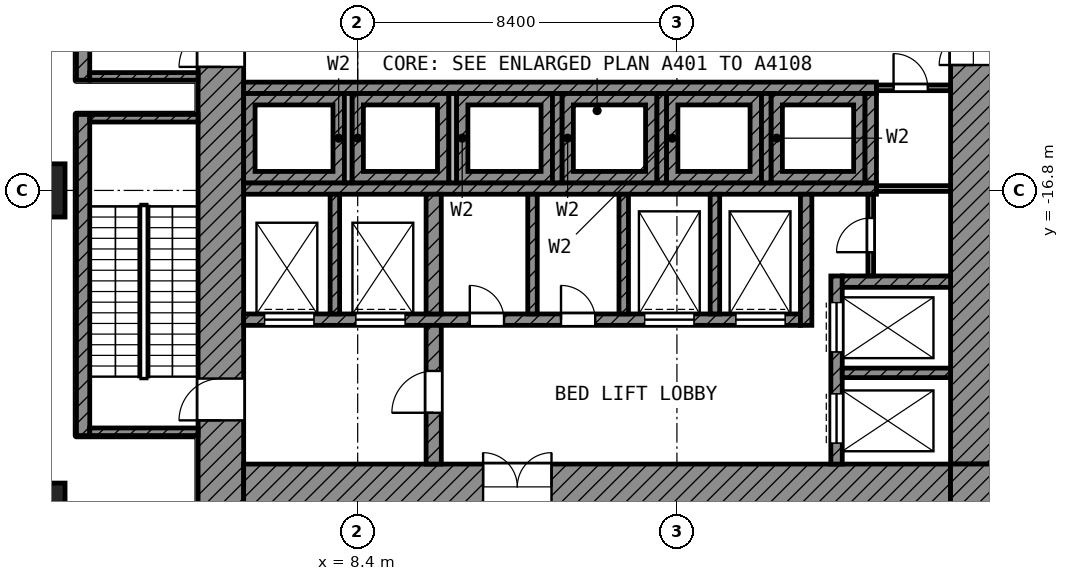
"""IFC4 building model, lengths in metres.
Left out: names, types, materials, properties, quantities, classifications, styles, units other than length and angle.
Written with IfcOpenShell. Run it as: python <this file> out.ifc"""

import sys

from ifc_helpers import new_model, si_unit, direction, frame, frame_2d, origin, origin_2d, place, context, subcontext, project, spatial, polyline, rectangle, outline, extrude, element, fill, save


model = new_model("IFC4")
c1 = context("Model", 3, precision=1e-05, world=origin(), true_north=direction((0.0, 1.0)))
c2 = subcontext(c1, "Body", "Model", "MODEL_VIEW")
j1 = project(units=[si_unit("LENGTHUNIT", "METRE"), si_unit("PLANEANGLEUNIT", "RADIAN")], contexts=[c1])
p1 = place(None, origin())
s1 = spatial("IfcSite", under=j1, at=p1, CompositionType="ELEMENT")
p2 = place(p1, origin())
s2 = spatial("IfcBuilding", under=s1, at=p2, CompositionType="ELEMENT")
p3 = place(p2, frame((0.0, 0.0, -6.0)))
s3 = spatial("IfcBuildingStorey", under=s2, at=p3, CompositionType="ELEMENT", Elevation=-6.0)
p4 = place(p3, origin())
e1 = element("IfcWall", 1, at=p4, inside=s3, PredefinedType="SHEAR", context=c2, shape_type="SweptSolid", body=[
    extrude(outline(polyline([(11.0, -16.6), (11.0, -14.25), (13.525, -14.25), (13.525, -16.6), (11.0, -16.6)]), holes=[polyline([(13.225, -14.55), (11.3, -14.55), (11.3, -16.3), (13.225, -16.3), (13.225, -14.55)])]), origin(), (0.0, 0.0, 1.0), 4.2),
])
e2 = element("IfcWall", 2, at=p4, inside=s3, PredefinedType="SHEAR", context=c2, shape_type="SweptSolid", body=[
    extrude(outline(polyline([(13.775, -16.6), (13.775, -14.25), (16.275, -14.25), (16.275, -16.6), (13.775, -16.6)]), holes=[polyline([(15.975, -14.55), (14.075, -14.55), (14.075, -16.3), (15.975, -16.3), (15.975, -14.55)])]), origin(), (0.0, 0.0, 1.0), 4.2),
])
e3 = element("IfcWall", 3, at=p4, inside=s3, PredefinedType="SHEAR", context=c2, shape_type="SweptSolid", body=[
    extrude(outline(polyline([(16.525, -16.6), (16.525, -14.25), (19.025, -14.25), (19.025, -16.6), (16.525, -16.6)]), holes=[polyline([(18.725, -14.55), (16.825, -14.55), (16.825, -16.3), (18.725, -16.3), (18.725, -14.55)])]), origin(), (0.0, 0.0, 1.0), 4.2),
])
e4 = element("IfcWall", 4, at=p4, inside=s3, PredefinedType="SHEAR", context=c2, shape_type="SweptSolid", body=[
    extrude(outline(polyline([(19.275, -16.6), (19.275, -14.25), (21.75, -14.25), (21.75, -16.6), (19.275, -16.6)]), holes=[polyline([(21.45, -14.55), (19.575, -14.55), (19.575, -16.3), (21.45, -16.3), (21.45, -14.55)])]), origin(), (0.0, 0.0, 1.0), 4.2),
])
e5 = element("IfcWall", 5, at=p4, inside=s3, PredefinedType="SHEAR", context=c2, shape_type="SweptSolid", body=[
    extrude(outline(polyline([(5.4, -16.6), (5.4, -14.25), (8.05, -14.25), (8.05, -16.6), (5.4, -16.6)]), holes=[polyline([(7.75, -14.55), (5.7, -14.55), (5.7, -16.3), (7.75, -16.3), (7.75, -14.55)])]), origin(), (0.0, 0.0, 1.0), 4.2),
])
e6 = element("IfcWall", 6, at=p4, inside=s3, PredefinedType="SHEAR", context=c2, shape_type="SweptSolid", body=[
    extrude(outline(polyline([(8.25, -16.6), (8.25, -14.25), (10.8, -14.25), (10.8, -16.6), (8.25, -16.6)]), holes=[polyline([(10.5, -14.55), (8.55, -14.55), (8.55, -16.3), (10.5, -16.3), (10.5, -14.55)])]), origin(), (0.0, 0.0, 1.0), 4.2),
])
for number, where, z_axis, x_axis in (
    (7, (0.0, -16.8, 0.0), (0.0, 0.0, 1.0), (1.0, 0.0, 0.0)),
    (8, (0.0, -25.2, 0.0), (0.0, 0.0, 1.0), (1.0, 0.0, 0.0)),
):
    element("IfcColumn", number, at=place(p3, frame(where, z_axis=z_axis, x_axis=x_axis)), inside=s3, PredefinedType="COLUMN", context=c2, shape_type="SweptSolid", body=[
        extrude(rectangle(XDim=1.4, YDim=1.4, at=origin_2d()), origin(), (0.0, 0.0, 1.0), 6.0),
    ])
p5 = place(p3, frame((4.8, -25.2, 0.0), z_axis=(0.0, 0.0, 1.0), x_axis=(0.0, 1.0, 0.0)))
e9 = element("IfcWall", 9, at=p5, inside=s3, PredefinedType="SHEAR", context=c2, shape_type="SweptSolid", body=[
    extrude(rectangle(XDim=19.8, YDim=1.2, at=frame_2d((9.9, 0.0))), origin(), (0.0, 0.0, 1.0), 5.55),
])
p6 = place(p5, frame((11.65, 0.0, 0.0)))
e10 = element("IfcOpeningElement", 10, at=p6, cuts=e9, PredefinedType="OPENING", context=c2, shape_type="SweptSolid", body=[
    extrude(rectangle(XDim=1.1, YDim=2.1, at=frame_2d((0.55, 1.05))), frame((0.0, 0.61, 0.0), z_axis=(0.0, -1.0, 0.0), x_axis=(1.0, 0.0, 0.0)), (0.0, 0.0, 1.0), 1.22),
])
p7 = place(p5, frame((2.35, 0.0, 0.0)))
e11 = element("IfcOpeningElement", 11, at=p7, cuts=e9, PredefinedType="OPENING", context=c2, shape_type="SweptSolid", body=[
    extrude(rectangle(XDim=1.1, YDim=2.1, at=frame_2d((0.55, 1.05))), frame((0.0, 0.61, 0.0), z_axis=(0.0, -1.0, 0.0), x_axis=(1.0, 0.0, 0.0)), (0.0, 0.0, 1.0), 1.22),
])
p8 = place(p3, frame((24.6, -24.0, 0.0), z_axis=(0.0, 0.0, 1.0), x_axis=(0.0, 1.0, 0.0)))
e12 = element("IfcWall", 12, at=p8, inside=s3, PredefinedType="SHEAR", context=c2, shape_type="SweptSolid", body=[
    extrude(rectangle(XDim=18.6, YDim=1.2, at=frame_2d((9.3, 0.0))), origin(), (0.0, 0.0, 1.0), 5.55),
])
p9 = place(p8, frame((10.5, 0.0, 0.0)))
e13 = element("IfcOpeningElement", 13, at=p9, cuts=e12, PredefinedType="OPENING", context=c2, shape_type="SweptSolid", body=[
    extrude(rectangle(XDim=1.8, YDim=2.1, at=frame_2d((0.9, 1.05))), frame((0.0, 0.61, 0.0), z_axis=(0.0, -1.0, 0.0), x_axis=(1.0, 0.0, 0.0)), (0.0, 0.0, 1.0), 1.22),
])
p10 = place(p3, frame((5.4, -24.6, 0.0), z_axis=(0.0, 0.0, 1.0), x_axis=(1.0, 0.0, 0.0)))
e14 = element("IfcWall", 14, at=p10, inside=s3, PredefinedType="SHEAR", context=c2, shape_type="SweptSolid", body=[
    extrude(rectangle(XDim=18.6, YDim=1.2, at=frame_2d((9.3, 0.0))), origin(), (0.0, 0.0, 1.0), 5.55),
])
p11 = place(p10, frame((6.3, 0.0, 0.0)))
e15 = element("IfcOpeningElement", 15, at=p11, cuts=e14, PredefinedType="OPENING", context=c2, shape_type="SweptSolid", body=[
    extrude(rectangle(XDim=1.8, YDim=2.1, at=frame_2d((0.9, 1.05))), frame((0.0, 0.61, 0.0), z_axis=(0.0, -1.0, 0.0), x_axis=(1.0, 0.0, 0.0)), (0.0, 0.0, 1.0), 1.22),
])
p12 = place(p3, frame((24.6, -25.2, 0.0), z_axis=(0.0, 0.0, 1.0), x_axis=(0.0, 1.0, 0.0)))
e16 = element("IfcWall", 16, at=p12, inside=s3, PredefinedType="SHEAR", context=c2, shape_type="SweptSolid", body=[
    extrude(rectangle(XDim=1.2, YDim=1.2, at=frame_2d((0.6, 0.0))), origin(), (0.0, 0.0, 1.0), 5.55),
])
for number, where, z_axis, x_axis in (
    (17, (5.4, -14.1, 0.0), (0.0, 0.0, 1.0), (1.0, 0.0, 0.0)),
    (18, (5.4, -16.75, 0.0), (0.0, 0.0, 1.0), (1.0, 0.0, 0.0)),
):
    element("IfcWall", number, at=place(p3, frame(where, z_axis=z_axis, x_axis=x_axis)), inside=s3, PredefinedType="SHEAR", context=c2, shape_type="SweptSolid", body=[
        extrude(rectangle(XDim=16.65, YDim=0.3, at=frame_2d((8.325, 0.0))), origin(), (0.0, 0.0, 1.0), 5.55),
    ])
p13 = place(p3, frame((5.4, -20.2, 0.0), z_axis=(0.0, 0.0, 1.0), x_axis=(1.0, 0.0, 0.0)))
e19 = element("IfcWall", 19, at=p13, inside=s3, PredefinedType="SHEAR", context=c2, shape_type="SweptSolid", body=[
    extrude(rectangle(XDim=14.65, YDim=0.3, at=frame_2d((7.325, 0.0))), origin(), (0.0, 0.0, 1.0), 5.55),
])
p14 = place(p13, frame((10.55, 0.0, 0.0)))
e20 = element("IfcOpeningElement", 20, at=p14, cuts=e19, PredefinedType="OPENING", context=c2, shape_type="SweptSolid", body=[
    extrude(rectangle(XDim=1.3, YDim=2.1, at=frame_2d((0.65, 1.05))), frame((0.0, 0.16, 0.0), z_axis=(0.0, -1.0, 0.0), x_axis=(1.0, 0.0, 0.0)), (0.0, 0.0, 1.0), 0.32),
])
p15 = place(p13, frame((12.95, 0.0, 0.0)))
e21 = element("IfcOpeningElement", 21, at=p15, cuts=e19, PredefinedType="OPENING", context=c2, shape_type="SweptSolid", body=[
    extrude(rectangle(XDim=1.3, YDim=2.1, at=frame_2d((0.65, 1.05))), frame((0.0, 0.16, 0.0), z_axis=(0.0, -1.0, 0.0), x_axis=(1.0, 0.0, 0.0)), (0.0, 0.0, 1.0), 0.32),
])
p16 = place(p13, frame((0.55, 0.0, 0.0)))
e22 = element("IfcOpeningElement", 22, at=p16, cuts=e19, PredefinedType="OPENING", context=c2, shape_type="SweptSolid", body=[
    extrude(rectangle(XDim=1.3, YDim=2.1, at=frame_2d((0.65, 1.05))), frame((0.0, 0.16, 0.0), z_axis=(0.0, -1.0, 0.0), x_axis=(1.0, 0.0, 0.0)), (0.0, 0.0, 1.0), 0.32),
])
p17 = place(p13, frame((2.95, 0.0, 0.0)))
e23 = element("IfcOpeningElement", 23, at=p17, cuts=e19, PredefinedType="OPENING", context=c2, shape_type="SweptSolid", body=[
    extrude(rectangle(XDim=1.3, YDim=2.1, at=frame_2d((0.65, 1.05))), frame((0.0, 0.16, 0.0), z_axis=(0.0, -1.0, 0.0), x_axis=(1.0, 0.0, 0.0)), (0.0, 0.0, 1.0), 0.32),
])
p18 = place(p13, frame((5.95, 0.0, 0.0)))
e24 = element("IfcOpeningElement", 24, at=p18, cuts=e19, PredefinedType="OPENING", context=c2, shape_type="SweptSolid", body=[
    extrude(rectangle(XDim=0.9, YDim=2.1, at=frame_2d((0.45, 1.05))), frame((0.0, 0.16, 0.0), z_axis=(0.0, -1.0, 0.0), x_axis=(1.0, 0.0, 0.0)), (0.0, 0.0, 1.0), 0.32),
])
p19 = place(p13, frame((8.35, 0.0, 0.0)))
e25 = element("IfcOpeningElement", 25, at=p19, cuts=e19, PredefinedType="OPENING", context=c2, shape_type="SweptSolid", body=[
    extrude(rectangle(XDim=0.9, YDim=2.1, at=frame_2d((0.45, 1.05))), frame((0.0, 0.16, 0.0), z_axis=(0.0, -1.0, 0.0), x_axis=(1.0, 0.0, 0.0)), (0.0, 0.0, 1.0), 0.32),
])
p20 = place(p3, frame((10.4, -24.0, 0.0), z_axis=(0.0, 0.0, 1.0), x_axis=(0.0, 1.0, 0.0)))
e26 = element("IfcWall", 26, at=p20, inside=s3, PredefinedType="SHEAR", context=c2, shape_type="SweptSolid", body=[
    extrude(rectangle(XDim=3.65, YDim=0.4, at=frame_2d((1.825, 0.0))), origin(), (0.0, 0.0, 1.0), 5.55),
])
p21 = place(p20, frame((1.35, 0.0, 0.0)))
e27 = element("IfcOpeningElement", 27, at=p21, cuts=e26, PredefinedType="OPENING", context=c2, shape_type="SweptSolid", body=[
    extrude(rectangle(XDim=1.1, YDim=2.1, at=frame_2d((0.55, 1.05))), frame((0.0, 0.21, 0.0), z_axis=(0.0, -1.0, 0.0), x_axis=(1.0, 0.0, 0.0)), (0.0, 0.0, 1.0), 0.42),
])
p22 = place(p3, frame((10.4, -20.05, 0.0), z_axis=(0.0, 0.0, 1.0), x_axis=(0.0, 1.0, 0.0)))
e28 = element("IfcWall", 28, at=p22, inside=s3, PredefinedType="SHEAR", context=c2, shape_type="SweptSolid", body=[
    extrude(rectangle(XDim=3.15, YDim=0.4, at=frame_2d((1.575, 0.0))), origin(), (0.0, 0.0, 1.0), 5.55),
])
p23 = place(p3, frame((20.2, -20.35, 0.0), z_axis=(0.0, 0.0, 1.0), x_axis=(0.0, 1.0, 0.0)))
e29 = element("IfcWall", 29, at=p23, inside=s3, PredefinedType="SHEAR", context=c2, shape_type="SweptSolid", body=[
    extrude(rectangle(XDim=3.45, YDim=0.3, at=frame_2d((1.725, 0.0))), origin(), (0.0, 0.0, 1.0), 5.55),
])
p24 = place(p3, frame((21.9, -16.6, 0.0), z_axis=(0.0, 0.0, 1.0), x_axis=(0.0, 1.0, 0.0)))
e30 = element("IfcWall", 30, at=p24, inside=s3, PredefinedType="SHEAR", context=c2, shape_type="SweptSolid", body=[
    extrude(rectangle(XDim=2.35, YDim=0.3, at=frame_2d((1.175, 0.0))), origin(), (0.0, 0.0, 1.0), 5.55),
])
p25 = place(p3, frame((21.15, -19.2, 0.0), z_axis=(0.0, 0.0, 1.0), x_axis=(1.0, 0.0, 0.0)))
e31 = element("IfcWall", 31, at=p25, inside=s3, PredefinedType="SHEAR", context=c2, shape_type="SweptSolid", body=[
    extrude(rectangle(XDim=2.85, YDim=0.3, at=frame_2d((1.425, 0.0))), origin(), (0.0, 0.0, 1.0), 5.55),
])
p26 = place(p3, frame((21.0, -24.0, 0.0), z_axis=(0.0, 0.0, 1.0), x_axis=(0.0, 1.0, 0.0)))
e32 = element("IfcWall", 32, at=p26, inside=s3, PredefinedType="SHEAR", context=c2, shape_type="SweptSolid", body=[
    extrude(rectangle(XDim=4.95, YDim=0.3, at=frame_2d((2.475, 0.0))), origin(), (0.0, 0.0, 1.0), 5.55),
])
p27 = place(p26, frame((2.95, 0.0, 0.0)))
e33 = element("IfcOpeningElement", 33, at=p27, cuts=e32, PredefinedType="OPENING", context=c2, shape_type="SweptSolid", body=[
    extrude(rectangle(XDim=1.3, YDim=2.1, at=frame_2d((0.65, 1.05))), frame((0.0, 0.16, 0.0), z_axis=(0.0, -1.0, 0.0), x_axis=(1.0, 0.0, 0.0)), (0.0, 0.0, 1.0), 0.32),
])
p28 = place(p26, frame((0.55, 0.0, 0.0)))
e34 = element("IfcOpeningElement", 34, at=p28, cuts=e32, PredefinedType="OPENING", context=c2, shape_type="SweptSolid", body=[
    extrude(rectangle(XDim=1.3, YDim=2.1, at=frame_2d((0.65, 1.05))), frame((0.0, 0.16, 0.0), z_axis=(0.0, -1.0, 0.0), x_axis=(1.0, 0.0, 0.0)), (0.0, 0.0, 1.0), 0.32),
])
p29 = place(p3, frame((21.15, -21.6, 0.0), z_axis=(0.0, 0.0, 1.0), x_axis=(1.0, 0.0, 0.0)))
e35 = element("IfcWall", 35, at=p29, inside=s3, PredefinedType="SHEAR", context=c2, shape_type="SweptSolid", body=[
    extrude(rectangle(XDim=2.85, YDim=0.25, at=frame_2d((1.425, 0.0))), origin(), (0.0, 0.0, 1.0), 5.55),
])
for number, where, z_axis, x_axis in (
    (36, (7.8, -20.05, 0.0), (0.0, 0.0, 1.0), (0.0, 1.0, 0.0)),
    (37, (13.0, -20.05, 0.0), (0.0, 0.0, 1.0), (0.0, 1.0, 0.0)),
    (38, (15.4, -20.05, 0.0), (0.0, 0.0, 1.0), (0.0, 1.0, 0.0)),
    (39, (17.8, -20.05, 0.0), (0.0, 0.0, 1.0), (0.0, 1.0, 0.0)),
):
    element("IfcWall", number, at=place(p3, frame(where, z_axis=z_axis, x_axis=x_axis)), inside=s3, PredefinedType="SHEAR", context=c2, shape_type="SweptSolid", body=[
        extrude(rectangle(XDim=3.15, YDim=0.25, at=frame_2d((1.575, 0.0))), origin(), (0.0, 0.0, 1.0), 5.55),
    ])
for number, where, z_axis, x_axis in (
    (40, (8.15, -16.6, 0.0), (0.0, 0.0, 1.0), (0.0, 1.0, 0.0)),
    (41, (10.9, -16.6, 0.0), (0.0, 0.0, 1.0), (0.0, 1.0, 0.0)),
):
    element("IfcWall", number, at=place(p3, frame(where, z_axis=z_axis, x_axis=x_axis)), inside=s3, PredefinedType="PARTITIONING", context=c2, shape_type="SweptSolid", body=[
        extrude(rectangle(XDim=2.35, YDim=0.2, at=frame_2d((1.175, 0.0))), origin(), (0.0, 0.0, 1.0), 5.55),
    ])
for number, where, z_axis, x_axis in (
    (42, (13.65, -16.6, 0.0), (0.0, 0.0, 1.0), (0.0, 1.0, 0.0)),
    (43, (16.4, -16.6, 0.0), (0.0, 0.0, 1.0), (0.0, 1.0, 0.0)),
    (44, (19.15, -16.6, 0.0), (0.0, 0.0, 1.0), (0.0, 1.0, 0.0)),
):
    element("IfcWall", number, at=place(p3, frame(where, z_axis=z_axis, x_axis=x_axis)), inside=s3, PredefinedType="SHEAR", context=c2, shape_type="SweptSolid", body=[
        extrude(rectangle(XDim=2.35, YDim=0.25, at=frame_2d((1.175, 0.0))), origin(), (0.0, 0.0, 1.0), 5.55),
    ])
p30 = place(p3, frame((21.9, -19.05, 0.0), z_axis=(0.0, 0.0, 1.0), x_axis=(0.0, 1.0, 0.0)))
e45 = element("IfcWall", 45, at=p30, inside=s3, PredefinedType="PARTITIONING", context=c2, shape_type="SweptSolid", body=[
    extrude(rectangle(XDim=2.15, YDim=0.15, at=frame_2d((1.075, 0.0))), origin(), (0.0, 0.0, 1.0), 5.55),
])
p31 = place(p30, frame((0.625, 0.0, 0.0)))
e46 = element("IfcOpeningElement", 46, at=p31, cuts=e45, PredefinedType="OPENING", context=c2, shape_type="SweptSolid", body=[
    extrude(rectangle(XDim=0.9, YDim=2.1, at=frame_2d((0.45, 1.05))), frame((0.0, 0.085, 0.0), z_axis=(0.0, -1.0, 0.0), x_axis=(1.0, 0.0, 0.0)), (0.0, 0.0, 1.0), 0.17),
])
p32 = place(p3, frame((22.05, -16.75, 0.0), z_axis=(0.0, 0.0, 1.0), x_axis=(1.0, 0.0, 0.0)))
e47 = element("IfcWall", 47, at=p32, inside=s3, PredefinedType="PARTITIONING", context=c2, shape_type="SweptSolid", body=[
    extrude(rectangle(XDim=1.95, YDim=0.15, at=frame_2d((0.975, 0.0))), origin(), (0.0, 0.0, 1.0), 5.55),
])
p33 = place(p3, frame((22.05, -14.1, 0.0), z_axis=(0.0, 0.0, 1.0), x_axis=(1.0, 0.0, 0.0)))
e48 = element("IfcWall", 48, at=p33, inside=s3, PredefinedType="PARTITIONING", context=c2, shape_type="SweptSolid", body=[
    extrude(rectangle(XDim=1.95, YDim=0.15, at=frame_2d((0.975, 0.0))), origin(), (0.0, 0.0, 1.0), 5.55),
])
p34 = place(p33, frame((0.45, 0.0, 0.0)))
e49 = element("IfcOpeningElement", 49, at=p34, cuts=e48, PredefinedType="OPENING", context=c2, shape_type="SweptSolid", body=[
    extrude(rectangle(XDim=0.9, YDim=2.1, at=frame_2d((0.45, 1.05))), frame((0.0, 0.085, 0.0), z_axis=(0.0, -1.0, 0.0), x_axis=(1.0, 0.0, 0.0)), (0.0, 0.0, 1.0), 0.17),
])
p35 = place(p3, frame((1.175, -13.9, 0.0), z_axis=(0.0, 0.0, 1.0), x_axis=(0.0, 1.0, 0.0)))
e50 = element("IfcWall", 50, at=p35, inside=s3, PredefinedType="SHEAR", context=c2, shape_type="SweptSolid", body=[
    extrude(rectangle(XDim=8.635, YDim=0.35, at=frame_2d((4.317, 0.0))), origin(), (0.0, 0.0, 1.0), 5.55),
])
p36 = place(p3, frame((1.35, -13.8, 0.0), z_axis=(0.0, 0.0, 1.0), x_axis=(1.0, 0.0, 0.0)))
e51 = element("IfcWall", 51, at=p36, inside=s3, PredefinedType="SHEAR", context=c2, shape_type="SweptSolid", body=[
    extrude(rectangle(XDim=2.85, YDim=0.2, at=frame_2d((1.425, 0.0))), origin(), (0.0, 0.0, 1.0), 5.55),
])
p37 = place(p3, frame((1.175, -23.25, 0.0), z_axis=(0.0, 0.0, 1.0), x_axis=(0.0, 1.0, 0.0)))
e52 = element("IfcWall", 52, at=p37, inside=s3, PredefinedType="SHEAR", context=c2, shape_type="SweptSolid", body=[
    extrude(rectangle(XDim=8.45, YDim=0.35, at=frame_2d((4.225, 0.0))), origin(), (0.0, 0.0, 1.0), 5.55),
])
for number, where, z_axis, x_axis in (
    (53, (1.35, -14.9, 0.0), (0.0, 0.0, 1.0), (1.0, 0.0, 0.0)),
    (54, (1.35, -23.15, 0.0), (0.0, 0.0, 1.0), (1.0, 0.0, 0.0)),
):
    element("IfcWall", number, at=place(p3, frame(where, z_axis=z_axis, x_axis=x_axis)), inside=s3, PredefinedType="SHEAR", context=c2, shape_type="SweptSolid", body=[
        extrude(rectangle(XDim=2.85, YDim=0.2, at=frame_2d((1.425, 0.0))), origin(), (0.0, 0.0, 1.0), 5.55),
    ])
p38 = place(p27, origin())
e55 = element("IfcDoor", 55, at=p38, inside=s3, OperationType="DOUBLE_DOOR_SLIDING", PredefinedType="DOOR", context=c2, shape_type="SweptSolid", body=[
    extrude(rectangle(XDim=1.3, YDim=2.1, at=frame_2d((0.65, 1.05))), frame((0.0, 0.025, 0.0), z_axis=(0.0, -1.0, 0.0), x_axis=(1.0, 0.0, 0.0)), (0.0, 0.0, 1.0), 0.05),
])
fill(e33, e55)
p39 = place(p28, origin())
e56 = element("IfcDoor", 56, at=p39, inside=s3, OperationType="DOUBLE_DOOR_SLIDING", PredefinedType="DOOR", context=c2, shape_type="SweptSolid", body=[
    extrude(rectangle(XDim=1.3, YDim=2.1, at=frame_2d((0.65, 1.05))), frame((0.0, 0.025, 0.0), z_axis=(0.0, -1.0, 0.0), x_axis=(1.0, 0.0, 0.0)), (0.0, 0.0, 1.0), 0.05),
])
fill(e34, e56)
p40 = place(p14, origin())
e57 = element("IfcDoor", 57, at=p40, inside=s3, OperationType="DOUBLE_DOOR_SLIDING", PredefinedType="DOOR", context=c2, shape_type="SweptSolid", body=[
    extrude(rectangle(XDim=1.3, YDim=2.1, at=frame_2d((0.65, 1.05))), frame((0.0, 0.025, 0.0), z_axis=(0.0, -1.0, 0.0), x_axis=(1.0, 0.0, 0.0)), (0.0, 0.0, 1.0), 0.05),
])
fill(e20, e57)
p41 = place(p15, origin())
e58 = element("IfcDoor", 58, at=p41, inside=s3, OperationType="DOUBLE_DOOR_SLIDING", PredefinedType="DOOR", context=c2, shape_type="SweptSolid", body=[
    extrude(rectangle(XDim=1.3, YDim=2.1, at=frame_2d((0.65, 1.05))), frame((0.0, 0.025, 0.0), z_axis=(0.0, -1.0, 0.0), x_axis=(1.0, 0.0, 0.0)), (0.0, 0.0, 1.0), 0.05),
])
fill(e21, e58)
p42 = place(p16, origin())
e59 = element("IfcDoor", 59, at=p42, inside=s3, OperationType="DOUBLE_DOOR_SLIDING", PredefinedType="DOOR", context=c2, shape_type="SweptSolid", body=[
    extrude(rectangle(XDim=1.3, YDim=2.1, at=frame_2d((0.65, 1.05))), frame((0.0, 0.025, 0.0), z_axis=(0.0, -1.0, 0.0), x_axis=(1.0, 0.0, 0.0)), (0.0, 0.0, 1.0), 0.05),
])
fill(e22, e59)
p43 = place(p17, origin())
e60 = element("IfcDoor", 60, at=p43, inside=s3, OperationType="DOUBLE_DOOR_SLIDING", PredefinedType="DOOR", context=c2, shape_type="SweptSolid", body=[
    extrude(rectangle(XDim=1.3, YDim=2.1, at=frame_2d((0.65, 1.05))), frame((0.0, 0.025, 0.0), z_axis=(0.0, -1.0, 0.0), x_axis=(1.0, 0.0, 0.0)), (0.0, 0.0, 1.0), 0.05),
])
fill(e23, e60)
p44 = place(p6, origin())
e61 = element("IfcDoor", 61, at=p44, inside=s3, OperationType="SINGLE_SWING_LEFT", PredefinedType="DOOR", context=c2, shape_type="SweptSolid", body=[
    extrude(rectangle(XDim=1.1, YDim=2.1, at=frame_2d((0.55, 1.05))), frame((0.0, 0.025, 0.0), z_axis=(0.0, -1.0, 0.0), x_axis=(1.0, 0.0, 0.0)), (0.0, 0.0, 1.0), 0.05),
])
fill(e10, e61)
p45 = place(p7, origin())
e62 = element("IfcDoor", 62, at=p45, inside=s3, OperationType="SINGLE_SWING_LEFT", PredefinedType="DOOR", context=c2, shape_type="SweptSolid", body=[
    extrude(rectangle(XDim=1.1, YDim=2.1, at=frame_2d((0.55, 1.05))), frame((0.0, 0.025, 0.0), z_axis=(0.0, -1.0, 0.0), x_axis=(1.0, 0.0, 0.0)), (0.0, 0.0, 1.0), 0.05),
])
fill(e11, e62)
p46 = place(p21, origin())
e63 = element("IfcDoor", 63, at=p46, inside=s3, OperationType="SINGLE_SWING_LEFT", PredefinedType="DOOR", context=c2, shape_type="SweptSolid", body=[
    extrude(rectangle(XDim=1.1, YDim=2.1, at=frame_2d((0.55, 1.05))), frame((0.0, 0.025, 0.0), z_axis=(0.0, -1.0, 0.0), x_axis=(1.0, 0.0, 0.0)), (0.0, 0.0, 1.0), 0.05),
])
fill(e27, e63)
p47 = place(p9, origin())
e64 = element("IfcDoor", 64, at=p47, inside=s3, OperationType="DOUBLE_DOOR_SINGLE_SWING", PredefinedType="DOOR", context=c2, shape_type="SweptSolid", body=[
    extrude(rectangle(XDim=1.8, YDim=2.1, at=frame_2d((0.9, 1.05))), frame((0.0, 0.025, 0.0), z_axis=(0.0, -1.0, 0.0), x_axis=(1.0, 0.0, 0.0)), (0.0, 0.0, 1.0), 0.05),
])
fill(e13, e64)
p48 = place(p11, origin())
e65 = element("IfcDoor", 65, at=p48, inside=s3, OperationType="DOUBLE_DOOR_SINGLE_SWING", PredefinedType="DOOR", context=c2, shape_type="SweptSolid", body=[
    extrude(rectangle(XDim=1.8, YDim=2.1, at=frame_2d((0.9, 1.05))), frame((0.0, 0.025, 0.0), z_axis=(0.0, -1.0, 0.0), x_axis=(1.0, 0.0, 0.0)), (0.0, 0.0, 1.0), 0.05),
])
fill(e15, e65)
p49 = place(p34, origin())
e66 = element("IfcDoor", 66, at=p49, inside=s3, OperationType="SINGLE_SWING_LEFT", PredefinedType="DOOR", context=c2, shape_type="SweptSolid", body=[
    extrude(rectangle(XDim=0.9, YDim=2.1, at=frame_2d((0.45, 1.05))), frame((0.0, 0.025, 0.0), z_axis=(0.0, -1.0, 0.0), x_axis=(1.0, 0.0, 0.0)), (0.0, 0.0, 1.0), 0.05),
])
fill(e49, e66)
p50 = place(p31, origin())
e67 = element("IfcDoor", 67, at=p50, inside=s3, OperationType="SINGLE_SWING_LEFT", PredefinedType="DOOR", context=c2, shape_type="SweptSolid", body=[
    extrude(rectangle(XDim=0.9, YDim=2.1, at=frame_2d((0.45, 1.05))), frame((0.0, 0.025, 0.0), z_axis=(0.0, -1.0, 0.0), x_axis=(1.0, 0.0, 0.0)), (0.0, 0.0, 1.0), 0.05),
])
fill(e46, e67)
p51 = place(p18, origin())
e68 = element("IfcDoor", 68, at=p51, inside=s3, OperationType="SINGLE_SWING_LEFT", PredefinedType="DOOR", context=c2, shape_type="SweptSolid", body=[
    extrude(rectangle(XDim=0.9, YDim=2.1, at=frame_2d((0.45, 1.05))), frame((0.0, 0.025, 0.0), z_axis=(0.0, -1.0, 0.0), x_axis=(1.0, 0.0, 0.0)), (0.0, 0.0, 1.0), 0.05),
])
fill(e24, e68)
p52 = place(p19, origin())
e69 = element("IfcDoor", 69, at=p52, inside=s3, OperationType="SINGLE_SWING_LEFT", PredefinedType="DOOR", context=c2, shape_type="SweptSolid", body=[
    extrude(rectangle(XDim=0.9, YDim=2.1, at=frame_2d((0.45, 1.05))), frame((0.0, 0.025, 0.0), z_axis=(0.0, -1.0, 0.0), x_axis=(1.0, 0.0, 0.0)), (0.0, 0.0, 1.0), 0.05),
])
fill(e25, e69)
save(model, sys.argv[1])
